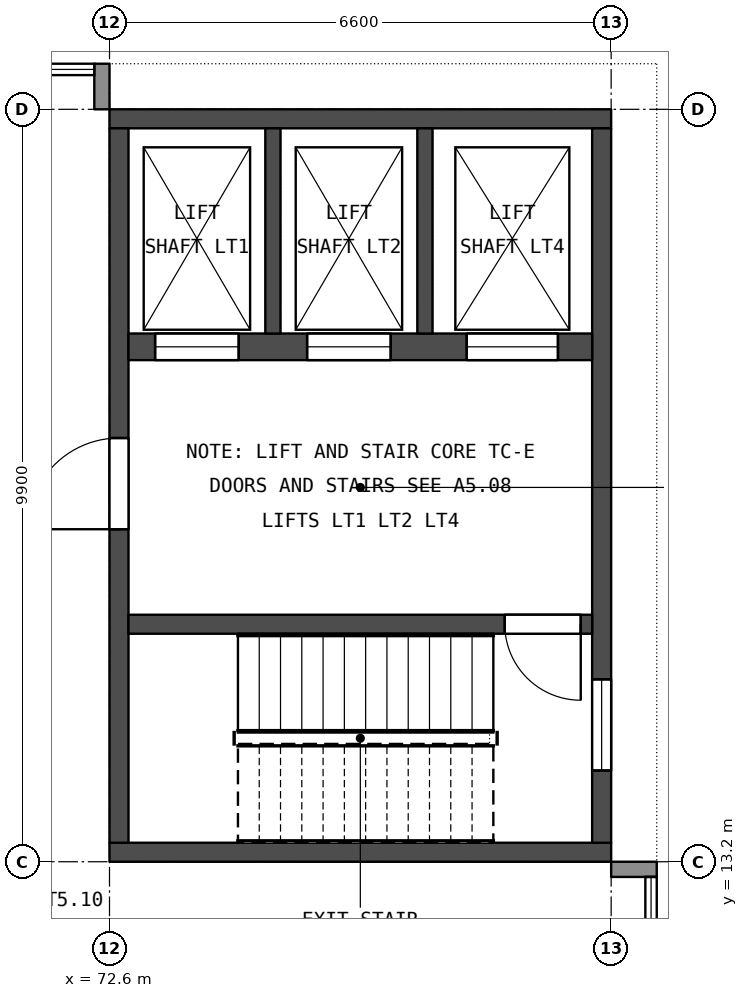
"""IFC4 building model, lengths in metres.
Left out: names, types, materials, properties, quantities, classifications, styles, units other than length and angle.
Written with IfcOpenShell. Run it as: python <this file> out.ifc"""

import sys

from ifc_helpers import new_model, si_unit, direction, frame, frame_2d, origin, place, context, subcontext, project, spatial, rectangle, extrude, element, fill, save


model = new_model("IFC4")
c1 = context("Model", 3, precision=1e-05, world=origin(), true_north=direction((0.0, 1.0)))
c2 = subcontext(c1, "Body", "Model", "MODEL_VIEW")
j1 = project(units=[si_unit("LENGTHUNIT", "METRE"), si_unit("PLANEANGLEUNIT", "RADIAN")], contexts=[c1])
p1 = place(None, origin())
s1 = spatial("IfcSite", under=j1, at=p1, CompositionType="ELEMENT")
p2 = place(p1, origin())
s2 = spatial("IfcBuilding", under=s1, at=p2, CompositionType="ELEMENT")
p3 = place(p2, frame((0.0, 0.0, 23.4)))
s3 = spatial("IfcBuildingStorey", under=s2, at=p3, CompositionType="ELEMENT", Elevation=23.4)
for number, where, z_axis, x_axis in (
    (1, (72.6, 13.325, 0.0), (0.0, 0.0, 1.0), (1.0, 0.0, 0.0)),
    (2, (72.6, 22.975, 0.0), (0.0, 0.0, 1.0), (1.0, 0.0, 0.0)),
):
    element("IfcWall", number, at=place(p3, frame(where, z_axis=z_axis, x_axis=x_axis)), inside=s3, PredefinedType="SHEAR", context=c2, shape_type="SweptSolid", body=[
        extrude(rectangle(XDim=6.6, YDim=0.25, at=frame_2d((3.3, 0.0))), origin(), (0.0, 0.0, 1.0), 4.2),
    ])
p4 = place(p3, frame((72.725, 13.45, 0.0), z_axis=(0.0, 0.0, 1.0), x_axis=(0.0, 1.0, 0.0)))
e3 = element("IfcWall", 3, at=p4, inside=s3, PredefinedType="SHEAR", context=c2, shape_type="SweptSolid", body=[
    extrude(rectangle(XDim=9.4, YDim=0.25, at=frame_2d((4.7, 0.0))), origin(), (0.0, 0.0, 1.0), 4.2),
])
p5 = place(p4, frame((4.125, 0.0, 0.0)))
e4 = element("IfcOpeningElement", 4, at=p5, cuts=e3, PredefinedType="OPENING", context=c2, shape_type="SweptSolid", body=[
    extrude(rectangle(XDim=1.2, YDim=2.1, at=frame_2d((0.6, 1.05))), frame((0.0, 0.135, 0.0), z_axis=(0.0, -1.0, 0.0), x_axis=(1.0, 0.0, 0.0)), (0.0, 0.0, 1.0), 0.27),
])
p6 = place(p3, frame((79.075, 13.45, 0.0), z_axis=(0.0, 0.0, 1.0), x_axis=(0.0, 1.0, 0.0)))
e5 = element("IfcWall", 5, at=p6, inside=s3, PredefinedType="SHEAR", context=c2, shape_type="SweptSolid", body=[
    extrude(rectangle(XDim=9.4, YDim=0.25, at=frame_2d((4.7, 0.0))), origin(), (0.0, 0.0, 1.0), 4.2),
])
p7 = place(p6, frame((0.95, 0.0, 0.7)))
e6 = element("IfcOpeningElement", 6, at=p7, cuts=e5, PredefinedType="OPENING", context=c2, shape_type="SweptSolid", body=[
    extrude(rectangle(XDim=1.2, YDim=1.8, at=frame_2d((0.6, 0.9))), frame((0.0, 0.135, 0.0), z_axis=(0.0, -1.0, 0.0), x_axis=(1.0, 0.0, 0.0)), (0.0, 0.0, 1.0), 0.27),
])
p8 = place(p3, frame((72.85, 16.325, 0.0), z_axis=(0.0, 0.0, 1.0), x_axis=(1.0, 0.0, 0.0)))
e7 = element("IfcWall", 7, at=p8, inside=s3, PredefinedType="SHEAR", context=c2, shape_type="SweptSolid", body=[
    extrude(rectangle(XDim=6.1, YDim=0.25, at=frame_2d((3.05, 0.0))), origin(), (0.0, 0.0, 1.0), 4.2),
])
p9 = place(p8, frame((4.95, 0.0, 0.0)))
e8 = element("IfcOpeningElement", 8, at=p9, cuts=e7, PredefinedType="OPENING", context=c2, shape_type="SweptSolid", body=[
    extrude(rectangle(XDim=1.0, YDim=2.2, at=frame_2d((0.5, 1.1))), frame((0.0, 0.135, 0.0), z_axis=(0.0, -1.0, 0.0), x_axis=(1.0, 0.0, 0.0)), (0.0, 0.0, 1.0), 0.27),
])
p10 = place(p3, frame((72.85, 19.975, 0.0), z_axis=(0.0, 0.0, 1.0), x_axis=(1.0, 0.0, 0.0)))
e9 = element("IfcWall", 9, at=p10, inside=s3, PredefinedType="SHEAR", context=c2, shape_type="SweptSolid", body=[
    extrude(rectangle(XDim=6.1, YDim=0.35, at=frame_2d((3.05, 0.0))), origin(), (0.0, 0.0, 1.0), 4.2),
])
p11 = place(p10, frame((0.35, 0.0, 0.0)))
e10 = element("IfcOpeningElement", 10, at=p11, cuts=e9, PredefinedType="OPENING", context=c2, shape_type="SweptSolid", body=[
    extrude(rectangle(XDim=1.1, YDim=2.2, at=frame_2d((0.55, 1.1))), frame((0.0, 0.185, 0.0), z_axis=(0.0, -1.0, 0.0), x_axis=(1.0, 0.0, 0.0)), (0.0, 0.0, 1.0), 0.37),
])
p12 = place(p10, frame((2.35, 0.0, 0.0)))
e11 = element("IfcOpeningElement", 11, at=p12, cuts=e9, PredefinedType="OPENING", context=c2, shape_type="SweptSolid", body=[
    extrude(rectangle(XDim=1.1, YDim=2.2, at=frame_2d((0.55, 1.1))), frame((0.0, 0.185, 0.0), z_axis=(0.0, -1.0, 0.0), x_axis=(1.0, 0.0, 0.0)), (0.0, 0.0, 1.0), 0.37),
])
p13 = place(p10, frame((4.45, 0.0, 0.0)))
e12 = element("IfcOpeningElement", 12, at=p13, cuts=e9, PredefinedType="OPENING", context=c2, shape_type="SweptSolid", body=[
    extrude(rectangle(XDim=1.2, YDim=2.3, at=frame_2d((0.6, 1.15))), frame((0.0, 0.185, 0.0), z_axis=(0.0, -1.0, 0.0), x_axis=(1.0, 0.0, 0.0)), (0.0, 0.0, 1.0), 0.37),
])
for number, where, z_axis, x_axis in (
    (13, (74.75, 20.15, 0.0), (0.0, 0.0, 1.0), (0.0, 1.0, 0.0)),
    (14, (76.75, 20.15, 0.0), (0.0, 0.0, 1.0), (0.0, 1.0, 0.0)),
):
    element("IfcWall", number, at=place(p3, frame(where, z_axis=z_axis, x_axis=x_axis)), inside=s3, PredefinedType="SHEAR", context=c2, shape_type="SweptSolid", body=[
        extrude(rectangle(XDim=2.7, YDim=0.2, at=frame_2d((1.35, 0.0))), origin(), (0.0, 0.0, 1.0), 4.2),
    ])
p14 = place(p3, frame((79.2, 13.1, 0.0), z_axis=(0.0, 0.0, 1.0), x_axis=(1.0, 0.0, 0.0)))
e15 = element("IfcWall", 15, at=p14, inside=s3, PredefinedType="STANDARD", context=c2, shape_type="SweptSolid", body=[
    extrude(rectangle(XDim=0.6, YDim=0.2, at=frame_2d((0.3, 0.0))), origin(), (0.0, 0.0, 1.0), 3.5),
])
p15 = place(p3, frame((72.5, 23.1, 0.0), z_axis=(0.0, 0.0, 1.0), x_axis=(0.0, 1.0, 0.0)))
e16 = element("IfcWall", 16, at=p15, inside=s3, PredefinedType="STANDARD", context=c2, shape_type="SweptSolid", body=[
    extrude(rectangle(XDim=0.6, YDim=0.2, at=frame_2d((0.3, 0.0))), origin(), (0.0, 0.0, 1.0), 3.5),
])
p16 = place(p5, origin())
e17 = element("IfcDoor", 17, at=p16, inside=s3, OperationType="SINGLE_SWING_LEFT", PredefinedType="DOOR", context=c2, shape_type="SweptSolid", body=[
    extrude(rectangle(XDim=1.2, YDim=2.1, at=frame_2d((0.6, 1.05))), frame((0.0, 0.025, 0.0), z_axis=(0.0, -1.0, 0.0), x_axis=(1.0, 0.0, 0.0)), (0.0, 0.0, 1.0), 0.05),
])
fill(e4, e17)
p17 = place(p9, origin())
e18 = element("IfcDoor", 18, at=p17, inside=s3, OperationType="SINGLE_SWING_RIGHT", PredefinedType="DOOR", context=c2, shape_type="SweptSolid", body=[
    extrude(rectangle(XDim=1.0, YDim=2.2, at=frame_2d((0.5, 1.1))), frame((0.0, 0.025, 0.0), z_axis=(0.0, -1.0, 0.0), x_axis=(1.0, 0.0, 0.0)), (0.0, 0.0, 1.0), 0.05),
])
fill(e8, e18)
p18 = place(p11, origin())
e19 = element("IfcDoor", 19, at=p18, inside=s3, OperationType="DOUBLE_DOOR_SLIDING", PredefinedType="NOTDEFINED", context=c2, shape_type="SweptSolid", body=[
    extrude(rectangle(XDim=1.1, YDim=2.2, at=frame_2d((0.55, 1.1))), frame((0.0, 0.025, 0.0), z_axis=(0.0, -1.0, 0.0), x_axis=(1.0, 0.0, 0.0)), (0.0, 0.0, 1.0), 0.05),
])
fill(e10, e19)
p19 = place(p12, origin())
e20 = element("IfcDoor", 20, at=p19, inside=s3, OperationType="DOUBLE_DOOR_SLIDING", PredefinedType="NOTDEFINED", context=c2, shape_type="SweptSolid", body=[
    extrude(rectangle(XDim=1.1, YDim=2.2, at=frame_2d((0.55, 1.1))), frame((0.0, 0.025, 0.0), z_axis=(0.0, -1.0, 0.0), x_axis=(1.0, 0.0, 0.0)), (0.0, 0.0, 1.0), 0.05),
])
fill(e11, e20)
p20 = place(p13, origin())
e21 = element("IfcDoor", 21, at=p20, inside=s3, OperationType="DOUBLE_DOOR_SLIDING", PredefinedType="NOTDEFINED", context=c2, shape_type="SweptSolid", body=[
    extrude(rectangle(XDim=1.2, YDim=2.3, at=frame_2d((0.6, 1.15))), frame((0.0, 0.025, 0.0), z_axis=(0.0, -1.0, 0.0), x_axis=(1.0, 0.0, 0.0)), (0.0, 0.0, 1.0), 0.05),
])
fill(e12, e21)
p21 = place(p7, origin())
e22 = element("IfcWindow", 22, at=p21, inside=s3, PartitioningType="SINGLE_PANEL", PredefinedType="WINDOW", context=c2, shape_type="SweptSolid", body=[
    extrude(rectangle(XDim=1.2, YDim=1.8, at=frame_2d((0.6, 0.9))), frame((0.0, 0.03, 0.0), z_axis=(0.0, -1.0, 0.0), x_axis=(1.0, 0.0, 0.0)), (0.0, 0.0, 1.0), 0.06),
])
fill(e6, e22)
save(model, sys.argv[1])
